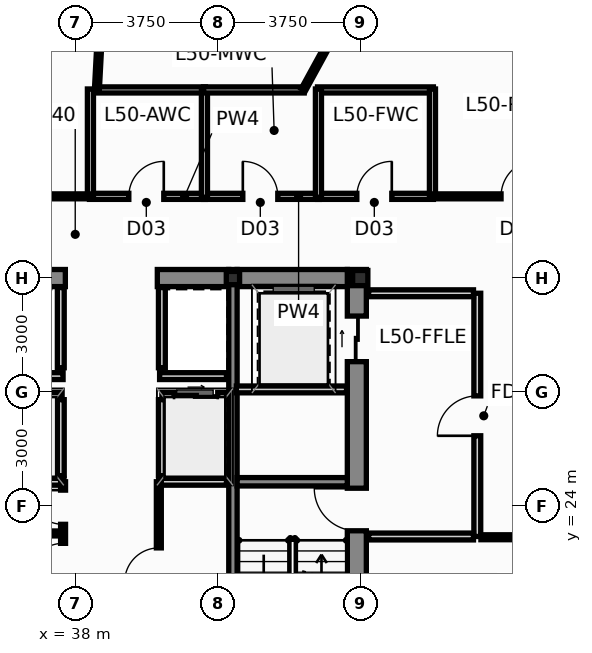
"""IFC4 building model, lengths in metres.
Left out: names, types, materials, properties, quantities, classifications, styles, units other than length and angle.
Written with IfcOpenShell. Run it as: python <this file> out.ifc"""

import sys

from ifc_helpers import new_model, si_unit, direction, frame, frame_2d, origin, origin_2d, place, context, subcontext, project, spatial, rectangle, hollow_rectangle, i_section, extrude, source, transform, mapped, element, fill, save


model = new_model("IFC4")
c1 = context("Model", 3, precision=1e-05, world=origin(), true_north=direction((0.0, 1.0)))
c2 = subcontext(c1, "Body", "Model", "MODEL_VIEW")
j1 = project(units=[si_unit("LENGTHUNIT", "METRE"), si_unit("PLANEANGLEUNIT", "RADIAN")], contexts=[c1])
p1 = place(None, origin())
s1 = spatial("IfcSite", under=j1, at=p1, CompositionType="ELEMENT")
p2 = place(p1, origin())
s2 = spatial("IfcBuilding", under=s1, at=p2, CompositionType="ELEMENT")
p3 = place(p2, frame((0.0, 0.0, 191.35)))
s3 = spatial("IfcBuildingStorey", under=s2, at=p3, CompositionType="ELEMENT", Elevation=191.35)
m1 = source(origin(), c2, "Body", "SweptSolid", [
    extrude(i_section(OverallWidth=0.4, OverallDepth=0.4, WebThickness=0.02, FlangeThickness=0.032, at=origin_2d()), origin(), (0.0, 0.0, 1.0), 3.65),
])
p4 = place(p3, frame((45.5, 30.0, 0.0), z_axis=(0.0, 0.0, 1.0), x_axis=(1.0, 0.0, 0.0)))
e1 = element("IfcColumn", 1, at=p4, inside=s3, PredefinedType="COLUMN", context=c2, shape_type="MappedRepresentation", body=[
    mapped(m1, transform((0.0, 0.0, 0.0), scale=1.0)),
])
m2 = source(origin(), c2, "Body", "SweptSolid", [
    extrude(hollow_rectangle(XDim=0.35, YDim=0.35, WallThickness=0.016, at=origin_2d()), origin(), (0.0, 0.0, 1.0), 3.65),
])
p5 = place(p3, frame((42.15, 30.0, 0.0), z_axis=(0.0, 0.0, 1.0), x_axis=(1.0, 0.0, 0.0)))
e2 = element("IfcColumn", 2, at=p5, inside=s3, PredefinedType="COLUMN", context=c2, shape_type="MappedRepresentation", body=[
    mapped(m2, transform((0.0, 0.0, 0.0), scale=1.0)),
])
p6 = place(p3, frame((45.41, 16.95, 0.0), z_axis=(0.0, 0.0, 1.0), x_axis=(0.0, 1.0, 0.0)))
e3 = element("IfcWall", 3, at=p6, inside=s3, PredefinedType="SHEAR", context=c2, shape_type="SweptSolid", body=[
    extrude(rectangle(XDim=13.275, YDim=0.5, at=frame_2d((6.638, 0.0))), origin(), (0.0, 0.0, 1.0), 3.65),
])
p7 = place(p6, frame((6.4, 0.0, 0.0)))
e4 = element("IfcOpeningElement", 4, at=p7, cuts=e3, PredefinedType="OPENING", context=c2, shape_type="SweptSolid", body=[
    extrude(rectangle(XDim=1.12, YDim=2.15, at=frame_2d((0.56, 1.075))), frame((0.0, 0.262, 0.0), z_axis=(0.0, -1.0, 0.0), x_axis=(1.0, 0.0, 0.0)), (0.0, 0.0, 1.0), 0.524),
])
p8 = place(p6, frame((10.85, 0.0, 0.0)))
e5 = element("IfcOpeningElement", 5, at=p8, cuts=e3, PredefinedType="OPENING", context=c2, shape_type="SweptSolid", body=[
    extrude(rectangle(XDim=1.2, YDim=2.2, at=frame_2d((0.6, 1.1))), frame((0.0, 0.262, 0.0), z_axis=(0.0, -1.0, 0.0), x_axis=(1.0, 0.0, 0.0)), (0.0, 0.0, 1.0), 0.524),
])
p9 = place(p3, frame((33.96, 30.0, 0.0), z_axis=(0.0, 0.0, 1.0), x_axis=(1.0, 0.0, 0.0)))
e6 = element("IfcWall", 6, at=p9, inside=s3, PredefinedType="SHEAR", context=c2, shape_type="SweptSolid", body=[
    extrude(rectangle(XDim=3.78, YDim=0.45, at=frame_2d((1.89, 0.0))), origin(), (0.0, 0.0, 1.0), 3.65),
])
p10 = place(p3, frame((40.16, 30.0, 0.0), z_axis=(0.0, 0.0, 1.0), x_axis=(1.0, 0.0, 0.0)))
e7 = element("IfcWall", 7, at=p10, inside=s3, PredefinedType="SHEAR", context=c2, shape_type="SweptSolid", body=[
    extrude(rectangle(XDim=1.88, YDim=0.45, at=frame_2d((0.94, 0.0))), origin(), (0.0, 0.0, 1.0), 3.65),
])
p11 = place(p3, frame((42.26, 30.0, 0.0), z_axis=(0.0, 0.0, 1.0), x_axis=(1.0, 0.0, 0.0)))
e8 = element("IfcWall", 8, at=p11, inside=s3, PredefinedType="SHEAR", context=c2, shape_type="SweptSolid", body=[
    extrude(rectangle(XDim=2.9, YDim=0.45, at=frame_2d((1.45, 0.0))), origin(), (0.0, 0.0, 1.0), 3.65),
])
p12 = place(p3, frame((42.15, 16.95, 0.0), z_axis=(0.0, 0.0, 1.0), x_axis=(0.0, 1.0, 0.0)))
e9 = element("IfcWall", 9, at=p12, inside=s3, PredefinedType="SHEAR", context=c2, shape_type="SweptSolid", body=[
    extrude(rectangle(XDim=13.275, YDim=0.22, at=frame_2d((6.638, 0.0))), origin(), (0.0, 0.0, 1.0), 3.65),
])
p13 = place(p3, frame((42.26, 24.64, 0.0), z_axis=(0.0, 0.0, 1.0), x_axis=(1.0, 0.0, 0.0)))
e10 = element("IfcWall", 10, at=p13, inside=s3, PredefinedType="SHEAR", context=c2, shape_type="SweptSolid", body=[
    extrude(rectangle(XDim=2.9, YDim=0.22, at=frame_2d((1.45, 0.0))), origin(), (0.0, 0.0, 1.0), 3.65),
])
p14 = place(p3, frame((34.02, 26.9, 0.0), z_axis=(0.0, 0.0, 1.0), x_axis=(1.0, 0.0, 0.0)))
e11 = element("IfcWall", 11, at=p14, inside=s3, PredefinedType="PARTITIONING", context=c2, shape_type="SweptSolid", body=[
    extrude(rectangle(XDim=3.6, YDim=0.18, at=frame_2d((1.8, 0.0))), origin(), (0.0, 0.0, 1.0), 3.4),
])
p15 = place(p14, frame((0.3, 0.0, 0.0)))
e12 = element("IfcOpeningElement", 12, at=p15, cuts=e11, PredefinedType="OPENING", context=c2, shape_type="SweptSolid", body=[
    extrude(rectangle(XDim=1.15, YDim=2.2, at=frame_2d((0.575, 1.1))), frame((0.0, 0.102, 0.0), z_axis=(0.0, -1.0, 0.0), x_axis=(1.0, 0.0, 0.0)), (0.0, 0.0, 1.0), 0.204),
])
p16 = place(p14, frame((2.1, 0.0, 0.0)))
e13 = element("IfcOpeningElement", 13, at=p16, cuts=e11, PredefinedType="OPENING", context=c2, shape_type="SweptSolid", body=[
    extrude(rectangle(XDim=1.15, YDim=2.2, at=frame_2d((0.575, 1.1))), frame((0.0, 0.102, 0.0), z_axis=(0.0, -1.0, 0.0), x_axis=(1.0, 0.0, 0.0)), (0.0, 0.0, 1.0), 0.204),
])
p17 = place(p3, frame((40.28, 26.9, 0.0), z_axis=(0.0, 0.0, 1.0), x_axis=(1.0, 0.0, 0.0)))
e14 = element("IfcWall", 14, at=p17, inside=s3, PredefinedType="PARTITIONING", context=c2, shape_type="SweptSolid", body=[
    extrude(rectangle(XDim=1.7, YDim=0.18, at=frame_2d((0.85, 0.0))), origin(), (0.0, 0.0, 1.0), 3.4),
])
p18 = place(p17, frame((0.32, 0.0, 0.0)))
e15 = element("IfcOpeningElement", 15, at=p18, cuts=e14, PredefinedType="OPENING", context=c2, shape_type="SweptSolid", body=[
    extrude(rectangle(XDim=1.15, YDim=2.2, at=frame_2d((0.575, 1.1))), frame((0.0, 0.102, 0.0), z_axis=(0.0, -1.0, 0.0), x_axis=(1.0, 0.0, 0.0)), (0.0, 0.0, 1.0), 0.204),
])
for number, where, z_axis, x_axis in (
    (16, (37.62, 24.8, 0.0), (0.0, 0.0, 1.0), (0.0, 1.0, 0.0)),
    (17, (40.28, 24.8, 0.0), (0.0, 0.0, 1.0), (0.0, 1.0, 0.0)),
):
    element("IfcWall", number, at=place(p3, frame(where, z_axis=z_axis, x_axis=x_axis)), inside=s3, PredefinedType="PARTITIONING", context=c2, shape_type="SweptSolid", body=[
        extrude(rectangle(XDim=2.0, YDim=0.18, at=frame_2d((1.0, 0.0))), origin(), (0.0, 0.0, 1.0), 3.4),
    ])
p19 = place(p3, frame((34.02, 24.64, 0.0), z_axis=(0.0, 0.0, 1.0), x_axis=(1.0, 0.0, 0.0)))
e18 = element("IfcWall", 18, at=p19, inside=s3, PredefinedType="PARTITIONING", context=c2, shape_type="SweptSolid", body=[
    extrude(rectangle(XDim=3.68, YDim=0.18, at=frame_2d((1.84, 0.0))), origin(), (0.0, 0.0, 1.0), 3.4),
])
p20 = place(p3, frame((40.2, 24.64, 0.0), z_axis=(0.0, 0.0, 1.0), x_axis=(1.0, 0.0, 0.0)))
e19 = element("IfcWall", 19, at=p20, inside=s3, PredefinedType="PARTITIONING", context=c2, shape_type="SweptSolid", body=[
    extrude(rectangle(XDim=1.78, YDim=0.18, at=frame_2d((0.89, 0.0))), origin(), (0.0, 0.0, 1.0), 3.4),
])
p21 = place(p3, frame((34.02, 27.42, 0.0), z_axis=(0.0, 0.0, 1.0), x_axis=(1.0, 0.0, 0.0)))
e20 = element("IfcWall", 20, at=p21, inside=s3, PredefinedType="PARTITIONING", context=c2, shape_type="SweptSolid", body=[
    extrude(rectangle(XDim=3.66, YDim=0.18, at=frame_2d((1.83, 0.0))), origin(), (0.0, 0.0, 1.0), 3.4),
])
p22 = place(p3, frame((40.22, 27.42, 0.0), z_axis=(0.0, 0.0, 1.0), x_axis=(1.0, 0.0, 0.0)))
e21 = element("IfcWall", 21, at=p22, inside=s3, PredefinedType="PARTITIONING", context=c2, shape_type="SweptSolid", body=[
    extrude(rectangle(XDim=1.76, YDim=0.18, at=frame_2d((0.88, 0.0))), origin(), (0.0, 0.0, 1.0), 3.4),
])
for number, where, z_axis, x_axis in (
    (22, (37.62, 27.64, 0.0), (0.0, 0.0, 1.0), (0.0, 1.0, 0.0)),
    (23, (40.28, 27.64, 0.0), (0.0, 0.0, 1.0), (0.0, 1.0, 0.0)),
):
    element("IfcWall", number, at=place(p3, frame(where, z_axis=z_axis, x_axis=x_axis)), inside=s3, PredefinedType="PARTITIONING", context=c2, shape_type="SweptSolid", body=[
        extrude(rectangle(XDim=2.11, YDim=0.18, at=frame_2d((1.055, 0.0))), origin(), (0.0, 0.0, 1.0), 3.4),
    ])
p23 = place(p3, frame((48.58, 23.2, 0.0), z_axis=(0.0, 0.0, 1.0), x_axis=(0.0, 1.0, 0.0)))
e24 = element("IfcWall", 24, at=p23, inside=s3, PredefinedType="PARTITIONING", context=c2, shape_type="SweptSolid", body=[
    extrude(rectangle(XDim=6.4, YDim=0.18, at=frame_2d((3.2, 0.0))), origin(), (0.0, 0.0, 1.0), 3.078),
])
p24 = place(p23, frame((2.65, 0.0, 0.0)))
e25 = element("IfcOpeningElement", 25, at=p24, cuts=e24, PredefinedType="OPENING", context=c2, shape_type="SweptSolid", body=[
    extrude(rectangle(XDim=1.05, YDim=2.15, at=frame_2d((0.525, 1.075))), frame((0.0, 0.102, 0.0), z_axis=(0.0, -1.0, 0.0), x_axis=(1.0, 0.0, 0.0)), (0.0, 0.0, 1.0), 0.204),
])
p25 = place(p3, frame((45.72, 23.2, 0.0), z_axis=(0.0, 0.0, 1.0), x_axis=(1.0, 0.0, 0.0)))
e26 = element("IfcWall", 26, at=p25, inside=s3, PredefinedType="PARTITIONING", context=c2, shape_type="SweptSolid", body=[
    extrude(rectangle(XDim=2.76, YDim=0.18, at=frame_2d((1.38, 0.0))), origin(), (0.0, 0.0, 1.0), 3.4),
])
p26 = place(p3, frame((45.72, 29.6, 0.0), z_axis=(0.0, 0.0, 1.0), x_axis=(1.0, 0.0, 0.0)))
e27 = element("IfcWall", 27, at=p26, inside=s3, PredefinedType="PARTITIONING", context=c2, shape_type="SweptSolid", body=[
    extrude(rectangle(XDim=2.76, YDim=0.18, at=frame_2d((1.38, 0.0))), origin(), (0.0, 0.0, 1.0), 2.925),
])
p27 = place(p3, frame((42.24, 27.07, 0.0), z_axis=(0.0, 0.0, 1.0), x_axis=(1.0, 0.0, 0.0)))
e28 = element("IfcWall", 28, at=p27, inside=s3, PredefinedType="PARTITIONING", context=c2, shape_type="SweptSolid", body=[
    extrude(rectangle(XDim=2.9, YDim=0.18, at=frame_2d((1.45, 0.0))), origin(), (0.0, 0.0, 1.0), 3.4),
])
p28 = place(p3, frame((34.02, 23.28, 0.0), z_axis=(0.0, 0.0, 1.0), x_axis=(1.0, 0.0, 0.0)))
e29 = element("IfcWall", 29, at=p28, inside=s3, PredefinedType="PARTITIONING", context=c2, shape_type="SweptSolid", body=[
    extrude(rectangle(XDim=3.58, YDim=0.13, at=frame_2d((1.79, 0.0))), origin(), (0.0, 0.0, 1.0), 3.4),
])
p29 = place(p3, frame((37.68, 20.5, 0.0), z_axis=(0.0, 0.0, 1.0), x_axis=(0.0, 1.0, 0.0)))
e30 = element("IfcWall", 30, at=p29, inside=s3, PredefinedType="PARTITIONING", context=c2, shape_type="SweptSolid", body=[
    extrude(rectangle(XDim=4.14, YDim=0.13, at=frame_2d((2.07, 0.0))), origin(), (0.0, 0.0, 1.0), 3.4),
])
p30 = place(p29, frame((0.22, 0.0, 0.0)))
e31 = element("IfcOpeningElement", 31, at=p30, cuts=e30, PredefinedType="OPENING", context=c2, shape_type="SweptSolid", body=[
    extrude(rectangle(XDim=0.9, YDim=2.1, at=frame_2d((0.45, 1.05))), frame((0.0, 0.077, 0.0), z_axis=(0.0, -1.0, 0.0), x_axis=(1.0, 0.0, 0.0)), (0.0, 0.0, 1.0), 0.154),
])
p31 = place(p29, frame((1.62, 0.0, 0.0)))
e32 = element("IfcOpeningElement", 32, at=p31, cuts=e30, PredefinedType="OPENING", context=c2, shape_type="SweptSolid", body=[
    extrude(rectangle(XDim=0.9, YDim=2.1, at=frame_2d((0.45, 1.05))), frame((0.0, 0.077, 0.0), z_axis=(0.0, -1.0, 0.0), x_axis=(1.0, 0.0, 0.0)), (0.0, 0.0, 1.0), 0.154),
])
p32 = place(p29, frame((3.02, 0.0, 0.0)))
e33 = element("IfcOpeningElement", 33, at=p32, cuts=e30, PredefinedType="OPENING", context=c2, shape_type="SweptSolid", body=[
    extrude(rectangle(XDim=0.9, YDim=2.1, at=frame_2d((0.45, 1.05))), frame((0.0, 0.077, 0.0), z_axis=(0.0, -1.0, 0.0), x_axis=(1.0, 0.0, 0.0)), (0.0, 0.0, 1.0), 0.154),
])
p33 = place(p3, frame((40.2, 20.5, 0.0), z_axis=(0.0, 0.0, 1.0), x_axis=(0.0, 1.0, 0.0)))
e34 = element("IfcWall", 34, at=p33, inside=s3, PredefinedType="PARTITIONING", context=c2, shape_type="SweptSolid", body=[
    extrude(rectangle(XDim=4.14, YDim=0.13, at=frame_2d((2.07, 0.0))), origin(), (0.0, 0.0, 1.0), 3.4),
])
p34 = place(p33, frame((1.5, 0.0, 0.0)))
e35 = element("IfcOpeningElement", 35, at=p34, cuts=e34, PredefinedType="OPENING", context=c2, shape_type="SweptSolid", body=[
    extrude(rectangle(XDim=0.9, YDim=2.1, at=frame_2d((0.45, 1.05))), frame((0.0, 0.077, 0.0), z_axis=(0.0, -1.0, 0.0), x_axis=(1.0, 0.0, 0.0)), (0.0, 0.0, 1.0), 0.154),
])
p35 = place(p3, frame((38.375, 32.15, 0.0), z_axis=(0.0, 0.0, 1.0), x_axis=(1.0, 0.0, 0.0)))
e36 = element("IfcWall", 36, at=p35, inside=s3, PredefinedType="PLUMBINGWALL", context=c2, shape_type="SweptSolid", body=[
    extrude(rectangle(XDim=3.05, YDim=0.16, at=frame_2d((1.525, 0.0))), origin(), (0.0, 0.0, 1.0), 3.4),
])
p36 = place(p35, frame((1.035, 0.0, 0.0)))
e37 = element("IfcOpeningElement", 37, at=p36, cuts=e36, PredefinedType="OPENING", context=c2, shape_type="SweptSolid", body=[
    extrude(rectangle(XDim=0.92, YDim=2.1, at=frame_2d((0.46, 1.05))), frame((0.0, 0.092, 0.0), z_axis=(0.0, -1.0, 0.0), x_axis=(1.0, 0.0, 0.0)), (0.0, 0.0, 1.0), 0.184),
])
p37 = place(p3, frame((41.375, 32.15, 0.0), z_axis=(0.0, 0.0, 1.0), x_axis=(1.0, 0.0, 0.0)))
e38 = element("IfcWall", 38, at=p37, inside=s3, PredefinedType="PLUMBINGWALL", context=c2, shape_type="SweptSolid", body=[
    extrude(rectangle(XDim=3.05, YDim=0.16, at=frame_2d((1.525, 0.0))), origin(), (0.0, 0.0, 1.0), 3.4),
])
p38 = place(p37, frame((1.035, 0.0, 0.0)))
e39 = element("IfcOpeningElement", 39, at=p38, cuts=e38, PredefinedType="OPENING", context=c2, shape_type="SweptSolid", body=[
    extrude(rectangle(XDim=0.92, YDim=2.1, at=frame_2d((0.46, 1.05))), frame((0.0, 0.092, 0.0), z_axis=(0.0, -1.0, 0.0), x_axis=(1.0, 0.0, 0.0)), (0.0, 0.0, 1.0), 0.184),
])
p39 = place(p3, frame((44.375, 32.15, 0.0), z_axis=(0.0, 0.0, 1.0), x_axis=(1.0, 0.0, 0.0)))
e40 = element("IfcWall", 40, at=p39, inside=s3, PredefinedType="PLUMBINGWALL", context=c2, shape_type="SweptSolid", body=[
    extrude(rectangle(XDim=3.05, YDim=0.16, at=frame_2d((1.525, 0.0))), origin(), (0.0, 0.0, 1.0), 3.4),
])
p40 = place(p39, frame((1.035, 0.0, 0.0)))
e41 = element("IfcOpeningElement", 41, at=p40, cuts=e40, PredefinedType="OPENING", context=c2, shape_type="SweptSolid", body=[
    extrude(rectangle(XDim=0.92, YDim=2.1, at=frame_2d((0.46, 1.05))), frame((0.0, 0.092, 0.0), z_axis=(0.0, -1.0, 0.0), x_axis=(1.0, 0.0, 0.0)), (0.0, 0.0, 1.0), 0.184),
])
p41 = place(p3, frame((47.425, 34.95, 0.0), z_axis=(0.0, 0.0, 1.0), x_axis=(-1.0, 0.0, 0.0)))
e42 = element("IfcWall", 42, at=p41, inside=s3, PredefinedType="PLUMBINGWALL", context=c2, shape_type="SweptSolid", body=[
    extrude(rectangle(XDim=3.05, YDim=0.16, at=frame_2d((1.525, 0.0))), origin(), (0.0, 0.0, 1.0), 3.4),
])
p42 = place(p3, frame((38.545, 34.95, 0.0), z_axis=(0.0, 0.0, 1.0), x_axis=(1.0, 0.0, 0.0)))
e43 = element("IfcWall", 43, at=p42, inside=s3, PredefinedType="PLUMBINGWALL", context=c2, shape_type="SweptSolid", body=[
    extrude(rectangle(XDim=2.88, YDim=0.16, at=frame_2d((1.44, 0.0))), origin(), (0.0, 0.0, 1.0), 3.4),
])
for number, where, z_axis, x_axis in (
    (44, (41.4, 32.125, 0.0), (0.0, 0.0, 1.0), (0.0, 1.0, 0.0)),
    (45, (38.4, 32.125, 0.0), (0.0, 0.0, 1.0), (0.0, 1.0, 0.0)),
):
    element("IfcWall", number, at=place(p3, frame(where, z_axis=z_axis, x_axis=x_axis)), inside=s3, PredefinedType="PLUMBINGWALL", context=c2, shape_type="SweptSolid", body=[
        extrude(rectangle(XDim=2.85, YDim=0.16, at=frame_2d((1.425, 0.0))), origin(), (0.0, 0.0, 1.0), 3.4),
    ])
p43 = place(p3, frame((44.4, 32.125, 0.0), z_axis=(0.0, 0.0, 1.0), x_axis=(0.0, 1.0, 0.0)))
e46 = element("IfcWall", 46, at=p43, inside=s3, PredefinedType="PLUMBINGWALL", context=c2, shape_type="SweptSolid", body=[
    extrude(rectangle(XDim=2.85, YDim=0.16, at=frame_2d((1.425, 0.0))), origin(), (0.0, 0.0, 1.0), 2.925),
])
p44 = place(p3, frame((47.4, 32.125, 0.0), z_axis=(0.0, 0.0, 1.0), x_axis=(0.0, 1.0, 0.0)))
e47 = element("IfcWall", 47, at=p44, inside=s3, PredefinedType="PLUMBINGWALL", context=c2, shape_type="SweptSolid", body=[
    extrude(rectangle(XDim=2.85, YDim=0.16, at=frame_2d((1.425, 0.0))), origin(), (0.0, 0.0, 1.0), 3.4),
])
p45 = place(p3, frame((41.375, 34.95, 0.0), z_axis=(0.0, 0.0, 1.0), x_axis=(1.0, 0.0, 0.0)))
e48 = element("IfcWall", 48, at=p45, inside=s3, PredefinedType="PLUMBINGWALL", context=c2, shape_type="SweptSolid", body=[
    extrude(rectangle(XDim=2.65, YDim=0.16, at=frame_2d((1.325, 0.0))), origin(), (0.0, 0.0, 1.0), 3.4),
])
p46 = place(p3, frame((38.57, 34.955, 0.0), z_axis=(0.0, 0.0, 1.0), x_axis=(0.052698688667, 0.998610458694, 0.0)))
e49 = element("IfcWall", 49, at=p46, inside=s3, PredefinedType="PARTITIONING", context=c2, shape_type="SweptSolid", body=[
    extrude(rectangle(XDim=16.034, YDim=0.13, at=frame_2d((8.017, 0.0))), origin(), (0.0, 0.0, 1.0), 3.4),
])
p47 = place(p46, frame((7.584, 0.0, 0.0)))
e50 = element("IfcOpeningElement", 50, at=p47, cuts=e49, PredefinedType="OPENING", context=c2, shape_type="SweptSolid", body=[
    extrude(rectangle(XDim=0.96, YDim=2.15, at=frame_2d((0.48, 1.075))), frame((0.0, 0.077, 0.0), z_axis=(0.0, -1.0, 0.0), x_axis=(1.0, 0.0, 0.0)), (0.0, 0.0, 1.0), 0.154),
])
p48 = place(p3, frame((44.002, 34.954, 0.0), z_axis=(0.0, 0.0, 1.0), x_axis=(0.480304674365, 0.877101715757, 0.0)))
e51 = element("IfcWall", 51, at=p48, inside=s3, PredefinedType="PARTITIONING", context=c2, shape_type="SweptSolid", body=[
    extrude(rectangle(XDim=7.192, YDim=0.13, at=frame_2d((3.596, 0.0))), origin(), (0.0, 0.0, 1.0), 3.4),
])
p49 = place(p3, frame((47.405, 32.15, 0.0), z_axis=(0.0, 0.0, 1.0), x_axis=(1.0, 0.0, 0.0)))
e52 = element("IfcWall", 52, at=p49, inside=s3, PredefinedType="PARTITIONING", context=c2, shape_type="SweptSolid", body=[
    extrude(rectangle(XDim=5.188, YDim=0.13, at=frame_2d((2.594, 0.0))), origin(), (0.0, 0.0, 1.0), 3.4),
])
p50 = place(p49, frame((1.8, 0.0, 0.0)))
e53 = element("IfcOpeningElement", 53, at=p50, cuts=e52, PredefinedType="OPENING", context=c2, shape_type="SweptSolid", body=[
    extrude(rectangle(XDim=0.96, YDim=2.15, at=frame_2d((0.48, 1.075))), frame((0.0, 0.077, 0.0), z_axis=(0.0, -1.0, 0.0), x_axis=(1.0, 0.0, 0.0)), (0.0, 0.0, 1.0), 0.154),
])
p51 = place(p3, frame((34.595, 32.15, 0.0), z_axis=(0.0, 0.0, 1.0), x_axis=(1.0, 0.0, 0.0)))
e54 = element("IfcWall", 54, at=p51, inside=s3, PredefinedType="PARTITIONING", context=c2, shape_type="SweptSolid", body=[
    extrude(rectangle(XDim=3.8, YDim=0.13, at=frame_2d((1.9, 0.0))), origin(), (0.0, 0.0, 1.0), 3.4),
])
p52 = place(p51, frame((1.42, 0.0, 0.0)))
e55 = element("IfcOpeningElement", 55, at=p52, cuts=e54, PredefinedType="OPENING", context=c2, shape_type="SweptSolid", body=[
    extrude(rectangle(XDim=0.96, YDim=2.15, at=frame_2d((0.48, 1.075))), frame((0.0, 0.077, 0.0), z_axis=(0.0, -1.0, 0.0), x_axis=(1.0, 0.0, 0.0)), (0.0, 0.0, 1.0), 0.154),
])
p53 = place(p3, frame((48.675, 23.18, 0.0), z_axis=(0.0, 0.0, 1.0), x_axis=(1.0, 0.0, 0.0)))
e56 = element("IfcWall", 56, at=p53, inside=s3, PredefinedType="PARTITIONING", context=c2, shape_type="SweptSolid", body=[
    extrude(rectangle(XDim=1.92, YDim=0.13, at=frame_2d((0.96, 0.0))), origin(), (0.0, 0.0, 1.0), 3.4),
])
p54 = place(p7, origin())
e57 = element("IfcDoor", 57, at=p54, inside=s3, OperationType="SINGLE_SWING_RIGHT", PredefinedType="DOOR", context=c2, shape_type="SweptSolid", body=[
    extrude(rectangle(XDim=1.12, YDim=2.15, at=frame_2d((0.56, 1.075))), frame((0.0, 0.025, 0.0), z_axis=(0.0, -1.0, 0.0), x_axis=(1.0, 0.0, 0.0)), (0.0, 0.0, 1.0), 0.05),
])
fill(e4, e57)
p55 = place(p8, origin())
e58 = element("IfcDoor", 58, at=p55, inside=s3, OperationType="SLIDING_TO_RIGHT", PredefinedType="DOOR", context=c2, shape_type="SweptSolid", body=[
    extrude(rectangle(XDim=1.2, YDim=2.2, at=frame_2d((0.6, 1.1))), frame((0.0, 0.025, 0.0), z_axis=(0.0, -1.0, 0.0), x_axis=(1.0, 0.0, 0.0)), (0.0, 0.0, 1.0), 0.05),
])
fill(e5, e58)
p56 = place(p18, origin())
e59 = element("IfcDoor", 59, at=p56, inside=s3, OperationType="SLIDING_TO_LEFT", PredefinedType="DOOR", context=c2, shape_type="SweptSolid", body=[
    extrude(rectangle(XDim=1.15, YDim=2.2, at=frame_2d((0.575, 1.1))), frame((0.0, 0.025, 0.0), z_axis=(0.0, -1.0, 0.0), x_axis=(1.0, 0.0, 0.0)), (0.0, 0.0, 1.0), 0.05),
])
fill(e15, e59)
p57 = place(p24, origin())
e60 = element("IfcDoor", 60, at=p57, inside=s3, OperationType="SINGLE_SWING_LEFT", PredefinedType="DOOR", context=c2, shape_type="SweptSolid", body=[
    extrude(rectangle(XDim=1.05, YDim=2.15, at=frame_2d((0.525, 1.075))), frame((0.0, 0.025, 0.0), z_axis=(0.0, -1.0, 0.0), x_axis=(1.0, 0.0, 0.0)), (0.0, 0.0, 1.0), 0.05),
])
fill(e25, e60)
p58 = place(p31, origin())
e61 = element("IfcDoor", 61, at=p58, inside=s3, OperationType="SINGLE_SWING_LEFT", PredefinedType="DOOR", context=c2, shape_type="SweptSolid", body=[
    extrude(rectangle(XDim=0.9, YDim=2.1, at=frame_2d((0.45, 1.05))), frame((0.0, 0.025, 0.0), z_axis=(0.0, -1.0, 0.0), x_axis=(1.0, 0.0, 0.0)), (0.0, 0.0, 1.0), 0.05),
])
fill(e32, e61)
p59 = place(p32, origin())
e62 = element("IfcDoor", 62, at=p59, inside=s3, OperationType="SINGLE_SWING_RIGHT", PredefinedType="DOOR", context=c2, shape_type="SweptSolid", body=[
    extrude(rectangle(XDim=0.9, YDim=2.1, at=frame_2d((0.45, 1.05))), frame((0.0, 0.025, 0.0), z_axis=(0.0, -1.0, 0.0), x_axis=(1.0, 0.0, 0.0)), (0.0, 0.0, 1.0), 0.05),
])
fill(e33, e62)
p60 = place(p34, origin())
e63 = element("IfcDoor", 63, at=p60, inside=s3, OperationType="SINGLE_SWING_LEFT", PredefinedType="DOOR", context=c2, shape_type="SweptSolid", body=[
    extrude(rectangle(XDim=0.9, YDim=2.1, at=frame_2d((0.45, 1.05))), frame((0.0, 0.025, 0.0), z_axis=(0.0, -1.0, 0.0), x_axis=(1.0, 0.0, 0.0)), (0.0, 0.0, 1.0), 0.05),
])
fill(e35, e63)
p61 = place(p36, origin())
e64 = element("IfcDoor", 64, at=p61, inside=s3, OperationType="SINGLE_SWING_RIGHT", PredefinedType="DOOR", context=c2, shape_type="SweptSolid", body=[
    extrude(rectangle(XDim=0.92, YDim=2.1, at=frame_2d((0.46, 1.05))), frame((0.0, 0.025, 0.0), z_axis=(0.0, -1.0, 0.0), x_axis=(1.0, 0.0, 0.0)), (0.0, 0.0, 1.0), 0.05),
])
fill(e37, e64)
p62 = place(p38, origin())
e65 = element("IfcDoor", 65, at=p62, inside=s3, OperationType="SINGLE_SWING_LEFT", PredefinedType="DOOR", context=c2, shape_type="SweptSolid", body=[
    extrude(rectangle(XDim=0.92, YDim=2.1, at=frame_2d((0.46, 1.05))), frame((0.0, 0.025, 0.0), z_axis=(0.0, -1.0, 0.0), x_axis=(1.0, 0.0, 0.0)), (0.0, 0.0, 1.0), 0.05),
])
fill(e39, e65)
p63 = place(p40, origin())
e66 = element("IfcDoor", 66, at=p63, inside=s3, OperationType="SINGLE_SWING_RIGHT", PredefinedType="DOOR", context=c2, shape_type="SweptSolid", body=[
    extrude(rectangle(XDim=0.92, YDim=2.1, at=frame_2d((0.46, 1.05))), frame((0.0, 0.025, 0.0), z_axis=(0.0, -1.0, 0.0), x_axis=(1.0, 0.0, 0.0)), (0.0, 0.0, 1.0), 0.05),
])
fill(e41, e66)
p64 = place(p50, origin())
e67 = element("IfcDoor", 67, at=p64, inside=s3, OperationType="SINGLE_SWING_RIGHT", PredefinedType="DOOR", context=c2, shape_type="SweptSolid", body=[
    extrude(rectangle(XDim=0.96, YDim=2.15, at=frame_2d((0.48, 1.075))), frame((0.0, 0.025, 0.0), z_axis=(0.0, -1.0, 0.0), x_axis=(1.0, 0.0, 0.0)), (0.0, 0.0, 1.0), 0.05),
])
fill(e53, e67)
save(model, sys.argv[1])
